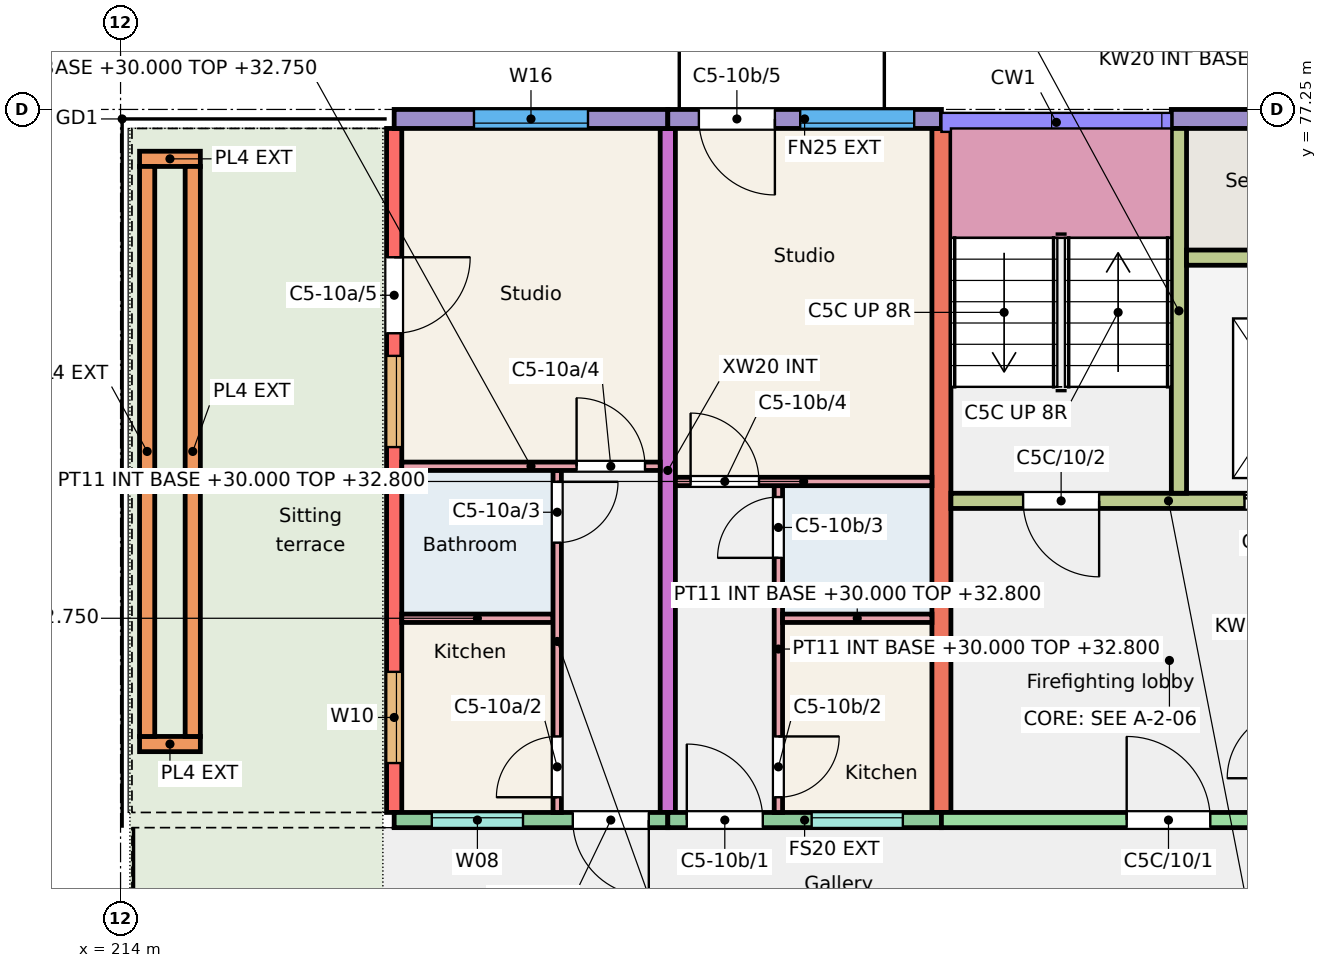
"""IFC4 building model, lengths in metres.
Left out: names, types, materials, properties, quantities, classifications, styles, units other than length and angle.
Written with IfcOpenShell. Run it as: python <this file> out.ifc"""

import sys

from ifc_helpers import new_model, si_unit, direction, frame, frame_2d, origin, place, context, subcontext, project, spatial, rectangle, extrude, element, fill, save


model = new_model("IFC4")
c1 = context("Model", 3, precision=1e-05, world=origin(), true_north=direction((0.0, 1.0)))
c2 = subcontext(c1, "Body", "Model", "MODEL_VIEW")
j1 = project(units=[si_unit("LENGTHUNIT", "METRE"), si_unit("PLANEANGLEUNIT", "RADIAN")], contexts=[c1])
p1 = place(None, origin())
s1 = spatial("IfcSite", under=j1, at=p1, CompositionType="ELEMENT")
p2 = place(p1, origin())
s2 = spatial("IfcBuilding", under=s1, at=p2, CompositionType="ELEMENT")
p3 = place(p2, frame((0.0, 0.0, 30.0)))
s3 = spatial("IfcBuildingStorey", under=s2, at=p3, CompositionType="ELEMENT", Elevation=30.0)
p4 = place(p3, frame((217.6, 68.0, 0.0), z_axis=(0.0, 0.0, 1.0), x_axis=(0.0, 1.0, 0.0)))
e1 = element("IfcWall", 1, at=p4, inside=s3, PredefinedType="SHEAR", context=c2, shape_type="SweptSolid", body=[
    extrude(rectangle(XDim=9.0, YDim=0.2, at=frame_2d((4.5, 0.0))), origin(), (0.0, 0.0, 1.0), 3.0),
])
p5 = place(p4, frame((0.65, 0.0, 0.9)))
e2 = element("IfcOpeningElement", 2, at=p5, cuts=e1, PredefinedType="OPENING", context=c2, shape_type="SweptSolid", body=[
    extrude(rectangle(XDim=1.2, YDim=1.5, at=frame_2d((0.6, 0.75))), frame((0.0, 0.11, 0.0), z_axis=(0.0, -1.0, 0.0), x_axis=(1.0, 0.0, 0.0)), (0.0, 0.0, 1.0), 0.22),
])
p6 = place(p4, frame((4.808, 0.0, 0.9)))
e3 = element("IfcOpeningElement", 3, at=p6, cuts=e1, PredefinedType="OPENING", context=c2, shape_type="SweptSolid", body=[
    extrude(rectangle(XDim=1.2, YDim=1.5, at=frame_2d((0.6, 0.75))), frame((0.0, 0.11, 0.0), z_axis=(0.0, -1.0, 0.0), x_axis=(1.0, 0.0, 0.0)), (0.0, 0.0, 1.0), 0.22),
])
p7 = place(p4, frame((6.305, 0.0, 0.0)))
e4 = element("IfcOpeningElement", 4, at=p7, cuts=e1, PredefinedType="OPENING", context=c2, shape_type="SweptSolid", body=[
    extrude(rectangle(XDim=1.0, YDim=2.1, at=frame_2d((0.5, 1.05))), frame((0.0, 0.11, 0.0), z_axis=(0.0, -1.0, 0.0), x_axis=(1.0, 0.0, 0.0)), (0.0, 0.0, 1.0), 0.22),
])
p8 = place(p3, frame((221.2, 68.0, 0.0), z_axis=(0.0, 0.0, 1.0), x_axis=(0.0, 1.0, 0.0)))
e5 = element("IfcWall", 5, at=p8, inside=s3, PredefinedType="SHEAR", context=c2, shape_type="SweptSolid", body=[
    extrude(rectangle(XDim=9.0, YDim=0.2, at=frame_2d((4.5, 0.0))), origin(), (0.0, 0.0, 1.0), 3.0),
])
p9 = place(p3, frame((224.8, 68.0, 0.0), z_axis=(0.0, 0.0, 1.0), x_axis=(0.0, 1.0, 0.0)))
e6 = element("IfcWall", 6, at=p9, inside=s3, PredefinedType="SHEAR", context=c2, shape_type="SweptSolid", body=[
    extrude(rectangle(XDim=9.0, YDim=0.25, at=frame_2d((4.5, 0.0))), origin(), (0.0, 0.0, 1.0), 3.0),
])
p10 = place(p3, frame((217.6, 77.125, 0.0), z_axis=(0.0, 0.0, 1.0), x_axis=(1.0, 0.0, 0.0)))
e7 = element("IfcWall", 7, at=p10, inside=s3, PredefinedType="SOLIDWALL", context=c2, shape_type="SweptSolid", body=[
    extrude(rectangle(XDim=3.6, YDim=0.25, at=frame_2d((1.8, 0.0))), origin(), (0.0, 0.0, 1.0), 3.0),
])
p11 = place(p10, frame((1.05, 0.0, 0.9)))
e8 = element("IfcOpeningElement", 8, at=p11, cuts=e7, PredefinedType="OPENING", context=c2, shape_type="SweptSolid", body=[
    extrude(rectangle(XDim=1.5, YDim=1.5, at=frame_2d((0.75, 0.75))), frame((0.0, 0.135, 0.0), z_axis=(0.0, -1.0, 0.0), x_axis=(1.0, 0.0, 0.0)), (0.0, 0.0, 1.0), 0.27),
])
p12 = place(p3, frame((217.6, 67.9, 0.0), z_axis=(0.0, 0.0, 1.0), x_axis=(1.0, 0.0, 0.0)))
e9 = element("IfcWall", 9, at=p12, inside=s3, PredefinedType="SOLIDWALL", context=c2, shape_type="SweptSolid", body=[
    extrude(rectangle(XDim=3.6, YDim=0.2, at=frame_2d((1.8, 0.0))), origin(), (0.0, 0.0, 1.0), 3.0),
])
p13 = place(p12, frame((0.495, 0.0, 1.1)))
e10 = element("IfcOpeningElement", 10, at=p13, cuts=e9, PredefinedType="OPENING", context=c2, shape_type="SweptSolid", body=[
    extrude(rectangle(XDim=1.2, YDim=1.3, at=frame_2d((0.6, 0.65))), frame((0.0, 0.11, 0.0), z_axis=(0.0, -1.0, 0.0), x_axis=(1.0, 0.0, 0.0)), (0.0, 0.0, 1.0), 0.22),
])
p14 = place(p12, frame((2.35, 0.0, 0.0)))
e11 = element("IfcOpeningElement", 11, at=p14, cuts=e9, PredefinedType="OPENING", context=c2, shape_type="SweptSolid", body=[
    extrude(rectangle(XDim=1.0, YDim=2.1, at=frame_2d((0.5, 1.05))), frame((0.0, 0.11, 0.0), z_axis=(0.0, -1.0, 0.0), x_axis=(1.0, 0.0, 0.0)), (0.0, 0.0, 1.0), 0.22),
])
p15 = place(p3, frame((221.2, 77.125, 0.0), z_axis=(0.0, 0.0, 1.0), x_axis=(1.0, 0.0, 0.0)))
e12 = element("IfcWall", 12, at=p15, inside=s3, PredefinedType="SOLIDWALL", context=c2, shape_type="SweptSolid", body=[
    extrude(rectangle(XDim=3.6, YDim=0.25, at=frame_2d((1.8, 0.0))), origin(), (0.0, 0.0, 1.0), 3.0),
])
p16 = place(p15, frame((1.742, 0.0, 0.9)))
e13 = element("IfcOpeningElement", 13, at=p16, cuts=e12, PredefinedType="OPENING", context=c2, shape_type="SweptSolid", body=[
    extrude(rectangle(XDim=1.5, YDim=1.5, at=frame_2d((0.75, 0.75))), frame((0.0, 0.135, 0.0), z_axis=(0.0, -1.0, 0.0), x_axis=(1.0, 0.0, 0.0)), (0.0, 0.0, 1.0), 0.27),
])
p17 = place(p15, frame((0.409, 0.0, 0.0)))
e14 = element("IfcOpeningElement", 14, at=p17, cuts=e12, PredefinedType="OPENING", context=c2, shape_type="SweptSolid", body=[
    extrude(rectangle(XDim=1.0, YDim=2.1, at=frame_2d((0.5, 1.05))), frame((0.0, 0.135, 0.0), z_axis=(0.0, -1.0, 0.0), x_axis=(1.0, 0.0, 0.0)), (0.0, 0.0, 1.0), 0.27),
])
p18 = place(p3, frame((221.2, 67.9, 0.0), z_axis=(0.0, 0.0, 1.0), x_axis=(1.0, 0.0, 0.0)))
e15 = element("IfcWall", 15, at=p18, inside=s3, PredefinedType="SOLIDWALL", context=c2, shape_type="SweptSolid", body=[
    extrude(rectangle(XDim=3.6, YDim=0.2, at=frame_2d((1.8, 0.0))), origin(), (0.0, 0.0, 1.0), 3.0),
])
p19 = place(p18, frame((1.893, 0.0, 1.1)))
e16 = element("IfcOpeningElement", 16, at=p19, cuts=e15, PredefinedType="OPENING", context=c2, shape_type="SweptSolid", body=[
    extrude(rectangle(XDim=1.2, YDim=1.3, at=frame_2d((0.6, 0.65))), frame((0.0, 0.11, 0.0), z_axis=(0.0, -1.0, 0.0), x_axis=(1.0, 0.0, 0.0)), (0.0, 0.0, 1.0), 0.22),
])
p20 = place(p18, frame((0.25, 0.0, 0.0)))
e17 = element("IfcOpeningElement", 17, at=p20, cuts=e15, PredefinedType="OPENING", context=c2, shape_type="SweptSolid", body=[
    extrude(rectangle(XDim=1.0, YDim=2.1, at=frame_2d((0.5, 1.05))), frame((0.0, 0.11, 0.0), z_axis=(0.0, -1.0, 0.0), x_axis=(1.0, 0.0, 0.0)), (0.0, 0.0, 1.0), 0.22),
])
p21 = place(p3, frame((227.825, 77.125, 0.0), z_axis=(0.0, 0.0, 1.0), x_axis=(1.0, 0.0, 0.0)))
e18 = element("IfcWall", 18, at=p21, inside=s3, PredefinedType="SOLIDWALL", context=c2, shape_type="SweptSolid", body=[
    extrude(rectangle(XDim=2.975, YDim=0.25, at=frame_2d((1.488, 0.0))), origin(), (0.0, 0.0, 1.0), 3.0),
])
p22 = place(p3, frame((224.8, 67.9, 0.0), z_axis=(0.0, 0.0, 1.0), x_axis=(1.0, 0.0, 0.0)))
e19 = element("IfcWall", 19, at=p22, inside=s3, PredefinedType="SHEAR", context=c2, shape_type="SweptSolid", body=[
    extrude(rectangle(XDim=5.85, YDim=0.2, at=frame_2d((2.925, 0.0))), origin(), (0.0, 0.0, 1.0), 3.0),
])
p23 = place(p22, frame((2.438, 0.0, 0.0)))
e20 = element("IfcOpeningElement", 20, at=p23, cuts=e19, PredefinedType="OPENING", context=c2, shape_type="SweptSolid", body=[
    extrude(rectangle(XDim=1.1, YDim=2.1, at=frame_2d((0.55, 1.05))), frame((0.0, 0.11, 0.0), z_axis=(0.0, -1.0, 0.0), x_axis=(1.0, 0.0, 0.0)), (0.0, 0.0, 1.0), 0.22),
])
p24 = place(p3, frame((224.925, 72.1, 0.0), z_axis=(0.0, 0.0, 1.0), x_axis=(1.0, 0.0, 0.0)))
e21 = element("IfcWall", 21, at=p24, inside=s3, PredefinedType="SHEAR", context=c2, shape_type="SweptSolid", body=[
    extrude(rectangle(XDim=5.725, YDim=0.2, at=frame_2d((2.862, 0.0))), origin(), (0.0, 0.0, 1.0), 3.0),
])
p25 = place(p24, frame((0.95, 0.0, 0.0)))
e22 = element("IfcOpeningElement", 22, at=p25, cuts=e21, PredefinedType="OPENING", context=c2, shape_type="SweptSolid", body=[
    extrude(rectangle(XDim=1.0, YDim=2.1, at=frame_2d((0.5, 1.05))), frame((0.0, 0.11, 0.0), z_axis=(0.0, -1.0, 0.0), x_axis=(1.0, 0.0, 0.0)), (0.0, 0.0, 1.0), 0.22),
])
p26 = place(p24, frame((3.863, 0.0, 0.0)))
e23 = element("IfcOpeningElement", 23, at=p26, cuts=e21, PredefinedType="OPENING", context=c2, shape_type="SweptSolid", body=[
    extrude(rectangle(XDim=1.1, YDim=2.1, at=frame_2d((0.55, 1.05))), frame((0.0, 0.11, 0.0), z_axis=(0.0, -1.0, 0.0), x_axis=(1.0, 0.0, 0.0)), (0.0, 0.0, 1.0), 0.22),
])
p27 = place(p3, frame((227.925, 72.2, 0.0), z_axis=(0.0, 0.0, 1.0), x_axis=(0.0, 1.0, 0.0)))
e24 = element("IfcWall", 24, at=p27, inside=s3, PredefinedType="SHEAR", context=c2, shape_type="SweptSolid", body=[
    extrude(rectangle(XDim=4.8, YDim=0.2, at=frame_2d((2.4, 0.0))), origin(), (0.0, 0.0, 1.0), 3.0),
])
p28 = place(p3, frame((228.025, 75.3, 0.0), z_axis=(0.0, 0.0, 1.0), x_axis=(1.0, 0.0, 0.0)))
e25 = element("IfcWall", 25, at=p28, inside=s3, PredefinedType="SHEAR", context=c2, shape_type="SweptSolid", body=[
    extrude(rectangle(XDim=2.625, YDim=0.2, at=frame_2d((1.312, 0.0))), origin(), (0.0, 0.0, 1.0), 3.0),
])
for number, where, z_axis, x_axis in (
    (26, (214.25, 68.9, 0.01), (0.0, 0.0, 1.0), (1.0, 0.0, 0.0)),
    (27, (214.25, 76.6, 0.01), (0.0, 0.0, 1.0), (1.0, 0.0, 0.0)),
):
    element("IfcWall", number, at=place(p3, frame(where, z_axis=z_axis, x_axis=x_axis)), inside=s3, PredefinedType="SOLIDWALL", context=c2, shape_type="SweptSolid", body=[
        extrude(rectangle(XDim=0.8, YDim=0.2, at=frame_2d((0.4, 0.0))), origin(), (0.0, 0.0, 1.0), 0.45),
    ])
for number, where, z_axis, x_axis in (
    (28, (214.35, 69.0, 0.01), (0.0, 0.0, 1.0), (0.0, 1.0, 0.0)),
    (29, (214.95, 69.0, 0.01), (0.0, 0.0, 1.0), (0.0, 1.0, 0.0)),
):
    element("IfcWall", number, at=place(p3, frame(where, z_axis=z_axis, x_axis=x_axis)), inside=s3, PredefinedType="SOLIDWALL", context=c2, shape_type="SweptSolid", body=[
        extrude(rectangle(XDim=7.5, YDim=0.2, at=frame_2d((3.75, 0.0))), origin(), (0.0, 0.0, 1.0), 0.45),
    ])
p29 = place(p3, frame((217.7, 70.555, 0.0), z_axis=(0.0, 0.0, 1.0), x_axis=(1.0, 0.0, 0.0)))
e30 = element("IfcWall", 30, at=p29, inside=s3, PredefinedType="PARTITIONING", context=c2, shape_type="SweptSolid", body=[
    extrude(rectangle(XDim=1.99, YDim=0.11, at=frame_2d((0.995, 0.0))), origin(), (0.0, 0.0, 1.0), 2.75),
])
p30 = place(p3, frame((219.745, 68.0, 0.0), z_axis=(0.0, 0.0, 1.0), x_axis=(0.0, 1.0, 0.0)))
e31 = element("IfcWall", 31, at=p30, inside=s3, PredefinedType="PARTITIONING", context=c2, shape_type="SweptSolid", body=[
    extrude(rectangle(XDim=4.5, YDim=0.11, at=frame_2d((2.25, 0.0))), origin(), (0.0, 0.0, 1.0), 2.75),
])
p31 = place(p30, frame((0.2, 0.0, 0.0)))
e32 = element("IfcOpeningElement", 32, at=p31, cuts=e31, PredefinedType="OPENING", context=c2, shape_type="SweptSolid", body=[
    extrude(rectangle(XDim=0.8, YDim=2.1, at=frame_2d((0.4, 1.05))), frame((0.0, 0.065, 0.0), z_axis=(0.0, -1.0, 0.0), x_axis=(1.0, 0.0, 0.0)), (0.0, 0.0, 1.0), 0.13),
])
p32 = place(p30, frame((3.55, 0.0, 0.0)))
e33 = element("IfcOpeningElement", 33, at=p32, cuts=e31, PredefinedType="OPENING", context=c2, shape_type="SweptSolid", body=[
    extrude(rectangle(XDim=0.8, YDim=2.1, at=frame_2d((0.4, 1.05))), frame((0.0, 0.065, 0.0), z_axis=(0.0, -1.0, 0.0), x_axis=(1.0, 0.0, 0.0)), (0.0, 0.0, 1.0), 0.13),
])
p33 = place(p3, frame((217.7, 72.555, 0.0), z_axis=(0.0, 0.0, 1.0), x_axis=(1.0, 0.0, 0.0)))
e34 = element("IfcWall", 34, at=p33, inside=s3, PredefinedType="PARTITIONING", context=c2, shape_type="SweptSolid", body=[
    extrude(rectangle(XDim=3.4, YDim=0.11, at=frame_2d((1.7, 0.0))), origin(), (0.0, 0.0, 1.0), 2.75),
])
p34 = place(p33, frame((2.3, 0.0, 0.0)))
e35 = element("IfcOpeningElement", 35, at=p34, cuts=e34, PredefinedType="OPENING", context=c2, shape_type="SweptSolid", body=[
    extrude(rectangle(XDim=0.9, YDim=2.1, at=frame_2d((0.45, 1.05))), frame((0.0, 0.065, 0.0), z_axis=(0.0, -1.0, 0.0), x_axis=(1.0, 0.0, 0.0)), (0.0, 0.0, 1.0), 0.13),
])
p35 = place(p3, frame((222.655, 68.0, 0.0), z_axis=(0.0, 0.0, 1.0), x_axis=(0.0, 1.0, 0.0)))
e36 = element("IfcWall", 36, at=p35, inside=s3, PredefinedType="PARTITIONING", context=c2, shape_type="SweptSolid", body=[
    extrude(rectangle(XDim=4.3, YDim=0.11, at=frame_2d((2.15, 0.0))), origin(), (0.0, 0.0, 1.0), 2.8),
])
p36 = place(p35, frame((0.2, 0.0, 0.0)))
e37 = element("IfcOpeningElement", 37, at=p36, cuts=e36, PredefinedType="OPENING", context=c2, shape_type="SweptSolid", body=[
    extrude(rectangle(XDim=0.8, YDim=2.1, at=frame_2d((0.4, 1.05))), frame((0.0, 0.065, 0.0), z_axis=(0.0, -1.0, 0.0), x_axis=(1.0, 0.0, 0.0)), (0.0, 0.0, 1.0), 0.13),
])
p37 = place(p35, frame((3.35, 0.0, 0.0)))
e38 = element("IfcOpeningElement", 38, at=p37, cuts=e36, PredefinedType="OPENING", context=c2, shape_type="SweptSolid", body=[
    extrude(rectangle(XDim=0.8, YDim=2.1, at=frame_2d((0.4, 1.05))), frame((0.0, 0.065, 0.0), z_axis=(0.0, -1.0, 0.0), x_axis=(1.0, 0.0, 0.0)), (0.0, 0.0, 1.0), 0.13),
])
p38 = place(p3, frame((222.71, 70.555, 0.0), z_axis=(0.0, 0.0, 1.0), x_axis=(1.0, 0.0, 0.0)))
e39 = element("IfcWall", 39, at=p38, inside=s3, PredefinedType="PARTITIONING", context=c2, shape_type="SweptSolid", body=[
    extrude(rectangle(XDim=1.965, YDim=0.11, at=frame_2d((0.982, 0.0))), origin(), (0.0, 0.0, 1.0), 2.8),
])
p39 = place(p3, frame((221.3, 72.355, 0.0), z_axis=(0.0, 0.0, 1.0), x_axis=(1.0, 0.0, 0.0)))
e40 = element("IfcWall", 40, at=p39, inside=s3, PredefinedType="PARTITIONING", context=c2, shape_type="SweptSolid", body=[
    extrude(rectangle(XDim=3.375, YDim=0.11, at=frame_2d((1.688, 0.0))), origin(), (0.0, 0.0, 1.0), 2.8),
])
p40 = place(p39, frame((0.2, 0.0, 0.0)))
e41 = element("IfcOpeningElement", 41, at=p40, cuts=e40, PredefinedType="OPENING", context=c2, shape_type="SweptSolid", body=[
    extrude(rectangle(XDim=0.9, YDim=2.1, at=frame_2d((0.45, 1.05))), frame((0.0, 0.065, 0.0), z_axis=(0.0, -1.0, 0.0), x_axis=(1.0, 0.0, 0.0)), (0.0, 0.0, 1.0), 0.13),
])
p41 = place(p13, origin())
e42 = element("IfcWindow", 42, at=p41, inside=s3, PartitioningType="SINGLE_PANEL", PredefinedType="WINDOW", context=c2, shape_type="SweptSolid", body=[
    extrude(rectangle(XDim=1.2, YDim=1.3, at=frame_2d((0.6, 0.65))), frame((0.0, 0.06, 0.0), z_axis=(0.0, -1.0, 0.0), x_axis=(1.0, 0.0, 0.0)), (0.0, 0.0, 1.0), 0.06),
])
fill(e10, e42)
p42 = place(p11, origin())
e43 = element("IfcWindow", 43, at=p42, inside=s3, PartitioningType="SINGLE_PANEL", PredefinedType="WINDOW", context=c2, shape_type="SweptSolid", body=[
    extrude(rectangle(XDim=1.5, YDim=1.5, at=frame_2d((0.75, 0.75))), frame((0.0, -0.025, 0.0), z_axis=(0.0, -1.0, 0.0), x_axis=(1.0, 0.0, 0.0)), (0.0, 0.0, 1.0), 0.06),
])
fill(e8, e43)
p43 = place(p5, origin())
e44 = element("IfcWindow", 44, at=p43, inside=s3, PartitioningType="SINGLE_PANEL", PredefinedType="WINDOW", context=c2, shape_type="SweptSolid", body=[
    extrude(rectangle(XDim=1.2, YDim=1.5, at=frame_2d((0.6, 0.75))), frame((0.0, 0.0, 0.0), z_axis=(0.0, -1.0, 0.0), x_axis=(1.0, 0.0, 0.0)), (0.0, 0.0, 1.0), 0.06),
])
fill(e2, e44)
p44 = place(p6, origin())
e45 = element("IfcWindow", 45, at=p44, inside=s3, PartitioningType="SINGLE_PANEL", PredefinedType="WINDOW", context=c2, shape_type="SweptSolid", body=[
    extrude(rectangle(XDim=1.2, YDim=1.5, at=frame_2d((0.6, 0.75))), frame((0.0, 0.0, 0.0), z_axis=(0.0, -1.0, 0.0), x_axis=(1.0, 0.0, 0.0)), (0.0, 0.0, 1.0), 0.06),
])
fill(e3, e45)
p45 = place(p19, origin())
e46 = element("IfcWindow", 46, at=p45, inside=s3, PartitioningType="SINGLE_PANEL", PredefinedType="WINDOW", context=c2, shape_type="SweptSolid", body=[
    extrude(rectangle(XDim=1.2, YDim=1.3, at=frame_2d((0.6, 0.65))), frame((0.0, 0.06, 0.0), z_axis=(0.0, -1.0, 0.0), x_axis=(1.0, 0.0, 0.0)), (0.0, 0.0, 1.0), 0.06),
])
fill(e16, e46)
p46 = place(p16, origin())
e47 = element("IfcWindow", 47, at=p46, inside=s3, PartitioningType="SINGLE_PANEL", PredefinedType="WINDOW", context=c2, shape_type="SweptSolid", body=[
    extrude(rectangle(XDim=1.5, YDim=1.5, at=frame_2d((0.75, 0.75))), frame((0.0, -0.025, 0.0), z_axis=(0.0, -1.0, 0.0), x_axis=(1.0, 0.0, 0.0)), (0.0, 0.0, 1.0), 0.06),
])
fill(e13, e47)
p47 = place(p14, origin())
e48 = element("IfcDoor", 48, at=p47, inside=s3, OperationType="SINGLE_SWING_RIGHT", PredefinedType="DOOR", context=c2, shape_type="SweptSolid", body=[
    extrude(rectangle(XDim=1.0, YDim=2.1, at=frame_2d((0.5, 1.05))), frame((0.0, 0.025, 0.0), z_axis=(0.0, -1.0, 0.0), x_axis=(1.0, 0.0, 0.0)), (0.0, 0.0, 1.0), 0.05),
])
fill(e11, e48)
p48 = place(p31, origin())
e49 = element("IfcDoor", 49, at=p48, inside=s3, OperationType="SINGLE_SWING_LEFT", PredefinedType="DOOR", context=c2, shape_type="SweptSolid", body=[
    extrude(rectangle(XDim=0.8, YDim=2.1, at=frame_2d((0.4, 1.05))), frame((0.0, 0.025, 0.0), z_axis=(0.0, -1.0, 0.0), x_axis=(1.0, 0.0, 0.0)), (0.0, 0.0, 1.0), 0.05),
])
fill(e32, e49)
p49 = place(p32, origin())
e50 = element("IfcDoor", 50, at=p49, inside=s3, OperationType="SINGLE_SWING_RIGHT", PredefinedType="DOOR", context=c2, shape_type="SweptSolid", body=[
    extrude(rectangle(XDim=0.8, YDim=2.1, at=frame_2d((0.4, 1.05))), frame((0.0, 0.025, 0.0), z_axis=(0.0, -1.0, 0.0), x_axis=(1.0, 0.0, 0.0)), (0.0, 0.0, 1.0), 0.05),
])
fill(e33, e50)
p50 = place(p34, origin())
e51 = element("IfcDoor", 51, at=p50, inside=s3, OperationType="SINGLE_SWING_LEFT", PredefinedType="DOOR", context=c2, shape_type="SweptSolid", body=[
    extrude(rectangle(XDim=0.9, YDim=2.1, at=frame_2d((0.45, 1.05))), frame((0.0, 0.025, 0.0), z_axis=(0.0, -1.0, 0.0), x_axis=(1.0, 0.0, 0.0)), (0.0, 0.0, 1.0), 0.05),
])
fill(e35, e51)
p51 = place(p7, origin())
e52 = element("IfcDoor", 52, at=p51, inside=s3, OperationType="SINGLE_SWING_RIGHT", PredefinedType="DOOR", context=c2, shape_type="SweptSolid", body=[
    extrude(rectangle(XDim=1.0, YDim=2.1, at=frame_2d((0.5, 1.05))), frame((0.0, 0.025, 0.0), z_axis=(0.0, -1.0, 0.0), x_axis=(1.0, 0.0, 0.0)), (0.0, 0.0, 1.0), 0.05),
])
fill(e4, e52)
p52 = place(p20, origin())
e53 = element("IfcDoor", 53, at=p52, inside=s3, OperationType="SINGLE_SWING_LEFT", PredefinedType="DOOR", context=c2, shape_type="SweptSolid", body=[
    extrude(rectangle(XDim=1.0, YDim=2.1, at=frame_2d((0.5, 1.05))), frame((0.0, 0.025, 0.0), z_axis=(0.0, -1.0, 0.0), x_axis=(1.0, 0.0, 0.0)), (0.0, 0.0, 1.0), 0.05),
])
fill(e17, e53)
p53 = place(p36, origin())
e54 = element("IfcDoor", 54, at=p53, inside=s3, OperationType="SINGLE_SWING_RIGHT", PredefinedType="DOOR", context=c2, shape_type="SweptSolid", body=[
    extrude(rectangle(XDim=0.8, YDim=2.1, at=frame_2d((0.4, 1.05))), frame((0.0, 0.025, 0.0), z_axis=(0.0, -1.0, 0.0), x_axis=(1.0, 0.0, 0.0)), (0.0, 0.0, 1.0), 0.05),
])
fill(e37, e54)
p54 = place(p37, origin())
e55 = element("IfcDoor", 55, at=p54, inside=s3, OperationType="SINGLE_SWING_LEFT", PredefinedType="DOOR", context=c2, shape_type="SweptSolid", body=[
    extrude(rectangle(XDim=0.8, YDim=2.1, at=frame_2d((0.4, 1.05))), frame((0.0, 0.025, 0.0), z_axis=(0.0, -1.0, 0.0), x_axis=(1.0, 0.0, 0.0)), (0.0, 0.0, 1.0), 0.05),
])
fill(e38, e55)
p55 = place(p40, origin())
e56 = element("IfcDoor", 56, at=p55, inside=s3, OperationType="SINGLE_SWING_LEFT", PredefinedType="DOOR", context=c2, shape_type="SweptSolid", body=[
    extrude(rectangle(XDim=0.9, YDim=2.1, at=frame_2d((0.45, 1.05))), frame((0.0, 0.025, 0.0), z_axis=(0.0, -1.0, 0.0), x_axis=(1.0, 0.0, 0.0)), (0.0, 0.0, 1.0), 0.05),
])
fill(e41, e56)
p56 = place(p17, origin())
e57 = element("IfcDoor", 57, at=p56, inside=s3, OperationType="SINGLE_SWING_RIGHT", PredefinedType="DOOR", context=c2, shape_type="SweptSolid", body=[
    extrude(rectangle(XDim=1.0, YDim=2.1, at=frame_2d((0.5, 1.05))), frame((0.0, 0.025, 0.0), z_axis=(0.0, -1.0, 0.0), x_axis=(1.0, 0.0, 0.0)), (0.0, 0.0, 1.0), 0.05),
])
fill(e14, e57)
p57 = place(p23, origin())
e58 = element("IfcDoor", 58, at=p57, inside=s3, OperationType="SINGLE_SWING_LEFT", PredefinedType="DOOR", context=c2, shape_type="SweptSolid", body=[
    extrude(rectangle(XDim=1.1, YDim=2.1, at=frame_2d((0.55, 1.05))), frame((0.0, 0.025, 0.0), z_axis=(0.0, -1.0, 0.0), x_axis=(1.0, 0.0, 0.0)), (0.0, 0.0, 1.0), 0.05),
])
fill(e20, e58)
p58 = place(p25, origin())
e59 = element("IfcDoor", 59, at=p58, inside=s3, OperationType="SINGLE_SWING_RIGHT", PredefinedType="DOOR", context=c2, shape_type="SweptSolid", body=[
    extrude(rectangle(XDim=1.0, YDim=2.1, at=frame_2d((0.5, 1.05))), frame((0.0, 0.025, 0.0), z_axis=(0.0, -1.0, 0.0), x_axis=(1.0, 0.0, 0.0)), (0.0, 0.0, 1.0), 0.05),
])
fill(e22, e59)
p59 = place(p26, origin())
e60 = element("IfcDoor", 60, at=p59, inside=s3, OperationType="DOUBLE_DOOR_SLIDING", PredefinedType="DOOR", context=c2, shape_type="SweptSolid", body=[
    extrude(rectangle(XDim=1.1, YDim=2.1, at=frame_2d((0.55, 1.05))), frame((0.0, 0.025, 0.0), z_axis=(0.0, -1.0, 0.0), x_axis=(1.0, 0.0, 0.0)), (0.0, 0.0, 1.0), 0.05),
])
fill(e23, e60)
save(model, sys.argv[1])
